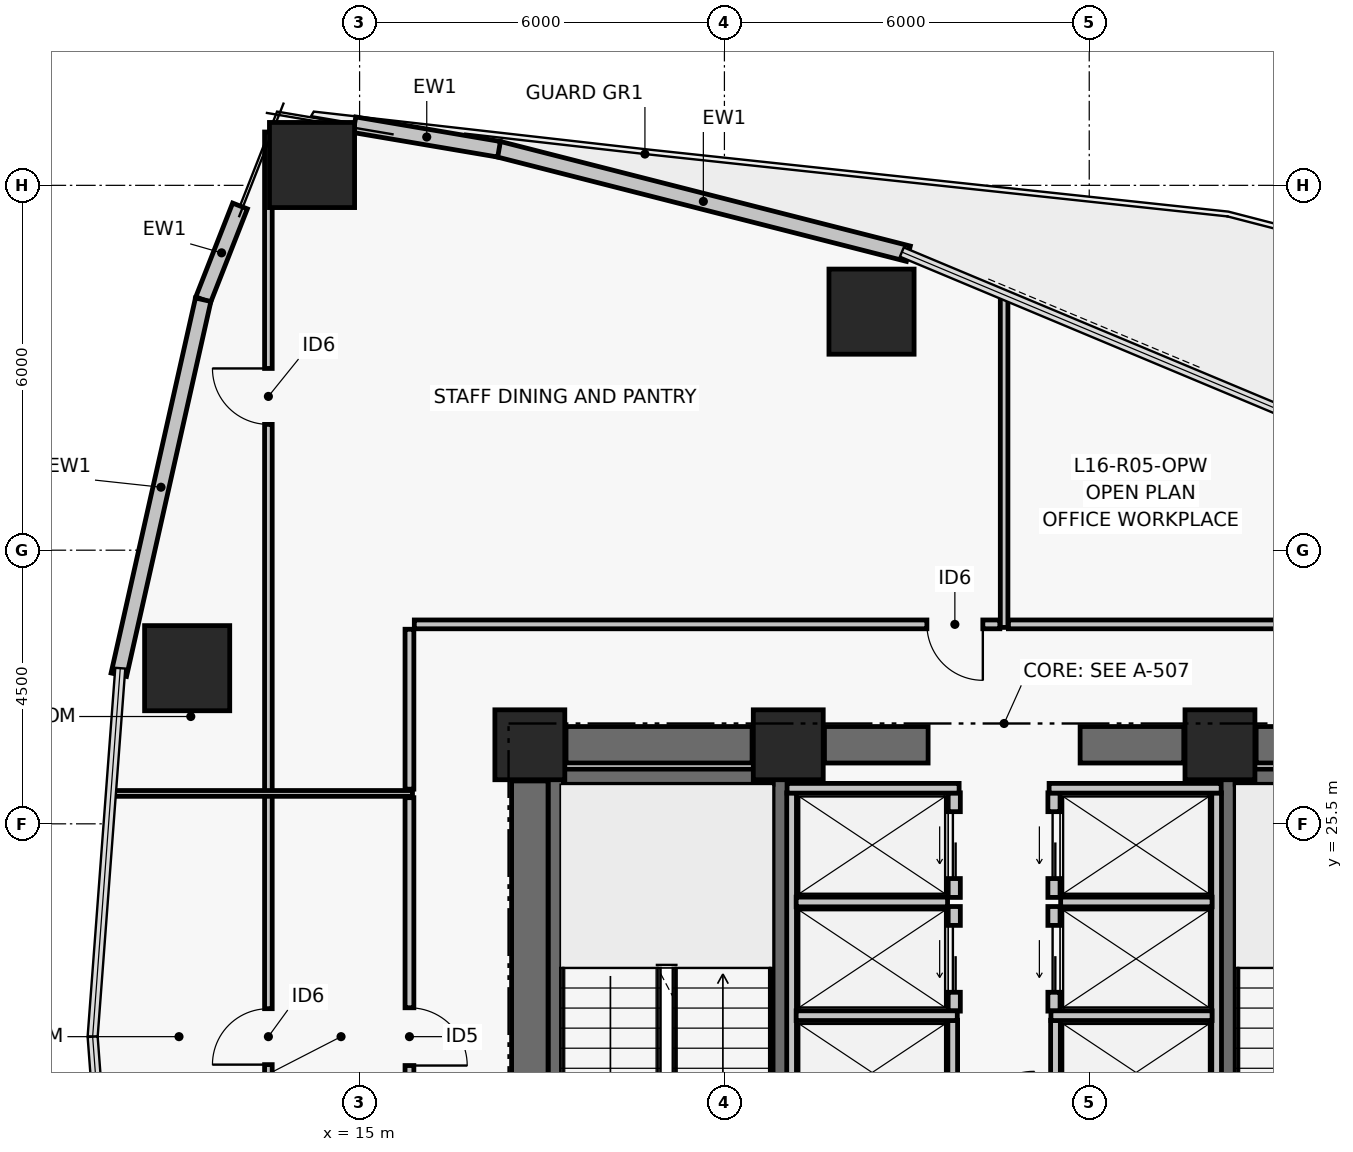
"""IFC4 building model, lengths in metres.
Left out: names, types, materials, properties, quantities, classifications, styles, units other than length and angle.
Written with IfcOpenShell. Run it as: python <this file> out.ifc"""

import sys

from ifc_helpers import new_model, si_unit, direction, frame, frame_2d, origin, origin_2d, place, context, subcontext, project, spatial, rectangle, hollow_rectangle, extrude, element, fill, save


model = new_model("IFC4")
c1 = context("Model", 3, precision=1e-05, world=origin(), true_north=direction((0.0, 1.0)))
c2 = subcontext(c1, "Body", "Model", "MODEL_VIEW")
j1 = project(units=[si_unit("LENGTHUNIT", "METRE"), si_unit("PLANEANGLEUNIT", "RADIAN")], contexts=[c1])
p1 = place(None, origin())
s1 = spatial("IfcSite", under=j1, at=p1, CompositionType="ELEMENT")
p2 = place(p1, origin())
s2 = spatial("IfcBuilding", under=s1, at=p2, CompositionType="ELEMENT")
p3 = place(p2, frame((0.0, 0.0, 68.52)))
s3 = spatial("IfcBuildingStorey", under=s2, at=p3, CompositionType="ELEMENT", Elevation=68.52)
for number, where, z_axis, x_axis in (
    (1, (17.8, 26.8, 0.0), (0.0, 0.0, 1.0), (1.0, 0.0, 0.0)),
    (2, (22.05, 26.8, 0.0), (0.0, 0.0, 1.0), (1.0, 0.0, 0.0)),
    (3, (29.15, 26.8, 0.0), (0.0, 0.0, 1.0), (1.0, 0.0, 0.0)),
):
    element("IfcColumn", number, at=place(p3, frame(where, z_axis=z_axis, x_axis=x_axis)), inside=s3, PredefinedType="COLUMN", context=c2, shape_type="SweptSolid", body=[
        extrude(rectangle(XDim=1.15, YDim=1.15, at=origin_2d()), origin(), (0.0, 0.0, 1.0), 3.72),
    ])
p4 = place(p3, frame((18.395, 26.8, 0.0), z_axis=(0.0, 0.0, 1.0), x_axis=(1.0, 0.0, 0.0)))
e4 = element("IfcWall", 4, at=p4, inside=s3, PredefinedType="SHEAR", context=c2, shape_type="SweptSolid", body=[
    extrude(rectangle(XDim=3.06, YDim=0.6, at=frame_2d((1.53, 0.0))), origin(), (0.0, 0.0, 1.0), 3.47),
])
p5 = place(p3, frame((22.645, 26.8, 0.0), z_axis=(0.0, 0.0, 1.0), x_axis=(1.0, 0.0, 0.0)))
e5 = element("IfcWall", 5, at=p5, inside=s3, PredefinedType="SHEAR", context=c2, shape_type="SweptSolid", body=[
    extrude(rectangle(XDim=1.705, YDim=0.6, at=frame_2d((0.853, 0.0))), origin(), (0.0, 0.0, 1.0), 3.47),
])
p6 = place(p3, frame((26.85, 26.8, 0.0), z_axis=(0.0, 0.0, 1.0), x_axis=(1.0, 0.0, 0.0)))
e6 = element("IfcWall", 6, at=p6, inside=s3, PredefinedType="SHEAR", context=c2, shape_type="SweptSolid", body=[
    extrude(rectangle(XDim=1.705, YDim=0.6, at=frame_2d((0.853, 0.0))), origin(), (0.0, 0.0, 1.0), 3.47),
])
p7 = place(p3, frame((29.745, 26.8, 0.0), z_axis=(0.0, 0.0, 1.0), x_axis=(1.0, 0.0, 0.0)))
e7 = element("IfcWall", 7, at=p7, inside=s3, PredefinedType="SHEAR", context=c2, shape_type="SweptSolid", body=[
    extrude(rectangle(XDim=3.06, YDim=0.6, at=frame_2d((1.53, 0.0))), origin(), (0.0, 0.0, 1.0), 3.47),
])
p8 = place(p3, frame((17.8, 17.795, 0.0), z_axis=(0.0, 0.0, 1.0), x_axis=(0.0, 1.0, 0.0)))
e8 = element("IfcWall", 8, at=p8, inside=s3, PredefinedType="SHEAR", context=c2, shape_type="SweptSolid", body=[
    extrude(rectangle(XDim=8.41, YDim=0.6, at=frame_2d((4.205, 0.0))), origin(), (0.0, 0.0, 1.0), 3.47),
])
p9 = place(p3, frame((18.229, 17.6, 0.0), z_axis=(0.0, 0.0, 1.0), x_axis=(0.0, 1.0, 0.0)))
e9 = element("IfcWall", 9, at=p9, inside=s3, PredefinedType="SHEAR", context=c2, shape_type="SweptSolid", body=[
    extrude(rectangle(XDim=8.8, YDim=0.25, at=frame_2d((4.4, 0.0))), origin(), (0.0, 0.0, 1.0), 3.47),
])
p10 = place(p3, frame((21.925, 17.6, 0.0), z_axis=(0.0, 0.0, 1.0), x_axis=(0.0, 1.0, 0.0)))
e10 = element("IfcWall", 10, at=p10, inside=s3, PredefinedType="SHEAR", context=c2, shape_type="SweptSolid", body=[
    extrude(rectangle(XDim=8.8, YDim=0.25, at=frame_2d((4.4, 0.0))), origin(), (0.0, 0.0, 1.0), 3.47),
])
p11 = place(p10, frame((0.35, 0.0, 0.0)))
e11 = element("IfcOpeningElement", 11, at=p11, cuts=e10, PredefinedType="OPENING", context=c2, shape_type="SweptSolid", body=[
    extrude(rectangle(XDim=1.05, YDim=2.08, at=frame_2d((0.525, 1.04))), frame((0.0, 0.135, 0.0), z_axis=(0.0, -1.0, 0.0), x_axis=(1.0, 0.0, 0.0)), (0.0, 0.0, 1.0), 0.27),
])
p12 = place(p3, frame((18.354, 26.275, 0.0), z_axis=(0.0, 0.0, 1.0), x_axis=(1.0, 0.0, 0.0)))
e12 = element("IfcWall", 12, at=p12, inside=s3, PredefinedType="SHEAR", context=c2, shape_type="SweptSolid", body=[
    extrude(rectangle(XDim=3.446, YDim=0.25, at=frame_2d((1.723, 0.0))), origin(), (0.0, 0.0, 1.0), 3.47),
])
p13 = place(p3, frame((29.275, 17.6, 0.0), z_axis=(0.0, 0.0, 1.0), x_axis=(0.0, 1.0, 0.0)))
e13 = element("IfcWall", 13, at=p13, inside=s3, PredefinedType="SHEAR", context=c2, shape_type="SweptSolid", body=[
    extrude(rectangle(XDim=8.8, YDim=0.25, at=frame_2d((4.4, 0.0))), origin(), (0.0, 0.0, 1.0), 3.47),
])
p14 = place(p13, frame((0.35, 0.0, 0.0)))
e14 = element("IfcOpeningElement", 14, at=p14, cuts=e13, PredefinedType="OPENING", context=c2, shape_type="SweptSolid", body=[
    extrude(rectangle(XDim=1.05, YDim=2.08, at=frame_2d((0.525, 1.04))), frame((0.0, 0.135, 0.0), z_axis=(0.0, -1.0, 0.0), x_axis=(1.0, 0.0, 0.0)), (0.0, 0.0, 1.0), 0.27),
])
p15 = place(p3, frame((29.4, 26.275, 0.0), z_axis=(0.0, 0.0, 1.0), x_axis=(1.0, 0.0, 0.0)))
e15 = element("IfcWall", 15, at=p15, inside=s3, PredefinedType="SHEAR", context=c2, shape_type="SweptSolid", body=[
    extrude(rectangle(XDim=3.446, YDim=0.25, at=frame_2d((1.723, 0.0))), origin(), (0.0, 0.0, 1.0), 3.47),
])
for number, where, z_axis, x_axis in (
    (16, (23.419, 33.923, 0.0), (0.0, 0.0, 1.0), (1.0, 0.0, 0.0)),
    (17, (14.218, 36.334, 0.0), (0.0, 0.0, 1.0), (1.0, 0.0, 0.0)),
    (18, (12.164, 28.06, 0.0), (0.0, 0.0, 1.0), (1.0, 0.0, 0.0)),
):
    element("IfcColumn", number, at=place(p3, frame(where, z_axis=z_axis, x_axis=x_axis)), inside=s3, PredefinedType="COLUMN", context=c2, shape_type="SweptSolid", body=[
        extrude(hollow_rectangle(XDim=1.4, YDim=1.4, WallThickness=0.055, at=origin_2d()), origin(), (0.0, 0.0, 1.0), 3.72),
    ])
p16 = place(p3, frame((17.282, 36.596, 0.0), z_axis=(0.0, 0.0, 1.0), x_axis=(0.968977974408, -0.247147092057, 0.0)))
e19 = element("IfcWall", 19, at=p16, inside=s3, PredefinedType="PARTITIONING", context=c2, shape_type="SweptSolid", body=[
    extrude(rectangle(XDim=6.959, YDim=0.26, at=frame_2d((3.479, 0.0))), origin(), (0.0, 0.0, 1.0), 3.47),
])
p17 = place(p3, frame((14.915, 36.997, 0.0), z_axis=(0.0, 0.0, 1.0), x_axis=(0.985905469923, -0.167303330437, 0.0)))
e20 = element("IfcWall", 20, at=p17, inside=s3, PredefinedType="PARTITIONING", context=c2, shape_type="SweptSolid", body=[
    extrude(rectangle(XDim=2.412, YDim=0.26, at=frame_2d((1.206, 0.0))), origin(), (0.0, 0.0, 1.0), 3.47),
])
p18 = place(p3, frame((12.427, 34.119, 0.0), z_axis=(0.0, 0.0, 1.0), x_axis=(0.365666052462, 0.930746119023, 0.0)))
e21 = element("IfcWall", 21, at=p18, inside=s3, PredefinedType="PARTITIONING", context=c2, shape_type="SweptSolid", body=[
    extrude(rectangle(XDim=1.656, YDim=0.26, at=frame_2d((0.828, 0.0))), origin(), (0.0, 0.0, 1.0), 3.47),
])
p19 = place(p3, frame((11.04, 27.952, 0.0), z_axis=(0.0, 0.0, 1.0), x_axis=(0.219502085231, 0.975612030768, 0.0)))
e22 = element("IfcWall", 22, at=p19, inside=s3, PredefinedType="PARTITIONING", context=c2, shape_type="SweptSolid", body=[
    extrude(rectangle(XDim=6.321, YDim=0.26, at=frame_2d((3.16, 0.0))), origin(), (0.0, 0.0, 1.0), 3.47),
])
p20 = place(p3, frame((24.78, 22.42, 0.0), z_axis=(0.0, 0.0, 1.0), x_axis=(0.0, 1.0, 0.0)))
e23 = element("IfcWall", 23, at=p20, inside=s3, PredefinedType="PARTITIONING", context=c2, shape_type="SweptSolid", body=[
    extrude(rectangle(XDim=1.72, YDim=0.2, at=frame_2d((0.86, 0.0))), origin(), (0.0, 0.0, 1.0), 3.47),
])
p21 = place(p20, frame((0.31, 0.0, 0.0)))
e24 = element("IfcOpeningElement", 24, at=p21, cuts=e23, PredefinedType="OPENING", context=c2, shape_type="SweptSolid", body=[
    extrude(rectangle(XDim=1.1, YDim=2.08, at=frame_2d((0.55, 1.04))), frame((0.0, 0.11, 0.0), z_axis=(0.0, -1.0, 0.0), x_axis=(1.0, 0.0, 0.0)), (0.0, 0.0, 1.0), 0.22),
])
p22 = place(p3, frame((24.78, 24.29, 0.0), z_axis=(0.0, 0.0, 1.0), x_axis=(0.0, 1.0, 0.0)))
e25 = element("IfcWall", 25, at=p22, inside=s3, PredefinedType="PARTITIONING", context=c2, shape_type="SweptSolid", body=[
    extrude(rectangle(XDim=1.72, YDim=0.2, at=frame_2d((0.86, 0.0))), origin(), (0.0, 0.0, 1.0), 3.47),
])
p23 = place(p22, frame((0.31, 0.0, 0.0)))
e26 = element("IfcOpeningElement", 26, at=p23, cuts=e25, PredefinedType="OPENING", context=c2, shape_type="SweptSolid", body=[
    extrude(rectangle(XDim=1.1, YDim=2.08, at=frame_2d((0.55, 1.04))), frame((0.0, 0.11, 0.0), z_axis=(0.0, -1.0, 0.0), x_axis=(1.0, 0.0, 0.0)), (0.0, 0.0, 1.0), 0.22),
])
p24 = place(p3, frame((26.42, 22.42, 0.0), z_axis=(0.0, 0.0, 1.0), x_axis=(0.0, 1.0, 0.0)))
e27 = element("IfcWall", 27, at=p24, inside=s3, PredefinedType="PARTITIONING", context=c2, shape_type="SweptSolid", body=[
    extrude(rectangle(XDim=1.72, YDim=0.2, at=frame_2d((0.86, 0.0))), origin(), (0.0, 0.0, 1.0), 3.47),
])
p25 = place(p24, frame((0.31, 0.0, 0.0)))
e28 = element("IfcOpeningElement", 28, at=p25, cuts=e27, PredefinedType="OPENING", context=c2, shape_type="SweptSolid", body=[
    extrude(rectangle(XDim=1.1, YDim=2.08, at=frame_2d((0.55, 1.04))), frame((0.0, 0.11, 0.0), z_axis=(0.0, -1.0, 0.0), x_axis=(1.0, 0.0, 0.0)), (0.0, 0.0, 1.0), 0.22),
])
p26 = place(p3, frame((26.42, 24.29, 0.0), z_axis=(0.0, 0.0, 1.0), x_axis=(0.0, 1.0, 0.0)))
e29 = element("IfcWall", 29, at=p26, inside=s3, PredefinedType="PARTITIONING", context=c2, shape_type="SweptSolid", body=[
    extrude(rectangle(XDim=1.72, YDim=0.2, at=frame_2d((0.86, 0.0))), origin(), (0.0, 0.0, 1.0), 3.47),
])
p27 = place(p26, frame((0.31, 0.0, 0.0)))
e30 = element("IfcOpeningElement", 30, at=p27, cuts=e29, PredefinedType="OPENING", context=c2, shape_type="SweptSolid", body=[
    extrude(rectangle(XDim=1.1, YDim=2.08, at=frame_2d((0.55, 1.04))), frame((0.0, 0.11, 0.0), z_axis=(0.0, -1.0, 0.0), x_axis=(1.0, 0.0, 0.0)), (0.0, 0.0, 1.0), 0.22),
])
p28 = place(p3, frame((22.105, 20.56, 0.0), z_axis=(0.0, 0.0, 1.0), x_axis=(0.0, 1.0, 0.0)))
e31 = element("IfcWall", 31, at=p28, inside=s3, PredefinedType="PARTITIONING", context=c2, shape_type="SweptSolid", body=[
    extrude(rectangle(XDim=5.45, YDim=0.16, at=frame_2d((2.725, 0.0))), origin(), (0.0, 0.0, 1.0), 3.47),
])
p29 = place(p3, frame((24.755, 20.56, 0.0), z_axis=(0.0, 0.0, 1.0), x_axis=(0.0, 1.0, 0.0)))
e32 = element("IfcWall", 32, at=p29, inside=s3, PredefinedType="PARTITIONING", context=c2, shape_type="SweptSolid", body=[
    extrude(rectangle(XDim=1.71, YDim=0.16, at=frame_2d((0.855, 0.0))), origin(), (0.0, 0.0, 1.0), 3.47),
])
p30 = place(p3, frame((22.18, 22.345, 0.0), z_axis=(0.0, 0.0, 1.0), x_axis=(1.0, 0.0, 0.0)))
e33 = element("IfcWall", 33, at=p30, inside=s3, PredefinedType="PARTITIONING", context=c2, shape_type="SweptSolid", body=[
    extrude(rectangle(XDim=2.65, YDim=0.16, at=frame_2d((1.325, 0.0))), origin(), (0.0, 0.0, 1.0), 3.47),
])
p31 = place(p3, frame((22.18, 24.215, 0.0), z_axis=(0.0, 0.0, 1.0), x_axis=(1.0, 0.0, 0.0)))
e34 = element("IfcWall", 34, at=p31, inside=s3, PredefinedType="PARTITIONING", context=c2, shape_type="SweptSolid", body=[
    extrude(rectangle(XDim=2.49, YDim=0.16, at=frame_2d((1.245, 0.0))), origin(), (0.0, 0.0, 1.0), 3.47),
])
p32 = place(p3, frame((22.03, 26.085, 0.0), z_axis=(0.0, 0.0, 1.0), x_axis=(1.0, 0.0, 0.0)))
e35 = element("IfcWall", 35, at=p32, inside=s3, PredefinedType="PARTITIONING", context=c2, shape_type="SweptSolid", body=[
    extrude(rectangle(XDim=2.83, YDim=0.16, at=frame_2d((1.415, 0.0))), origin(), (0.0, 0.0, 1.0), 3.47),
])
p33 = place(p3, frame((29.095, 20.56, 0.0), z_axis=(0.0, 0.0, 1.0), x_axis=(0.0, 1.0, 0.0)))
e36 = element("IfcWall", 36, at=p33, inside=s3, PredefinedType="PARTITIONING", context=c2, shape_type="SweptSolid", body=[
    extrude(rectangle(XDim=5.45, YDim=0.16, at=frame_2d((2.725, 0.0))), origin(), (0.0, 0.0, 1.0), 3.47),
])
p34 = place(p3, frame((26.445, 20.56, 0.0), z_axis=(0.0, 0.0, 1.0), x_axis=(0.0, 1.0, 0.0)))
e37 = element("IfcWall", 37, at=p34, inside=s3, PredefinedType="PARTITIONING", context=c2, shape_type="SweptSolid", body=[
    extrude(rectangle(XDim=1.71, YDim=0.16, at=frame_2d((0.855, 0.0))), origin(), (0.0, 0.0, 1.0), 3.47),
])
p35 = place(p3, frame((26.37, 22.345, 0.0), z_axis=(0.0, 0.0, 1.0), x_axis=(1.0, 0.0, 0.0)))
e38 = element("IfcWall", 38, at=p35, inside=s3, PredefinedType="PARTITIONING", context=c2, shape_type="SweptSolid", body=[
    extrude(rectangle(XDim=2.65, YDim=0.16, at=frame_2d((1.325, 0.0))), origin(), (0.0, 0.0, 1.0), 3.47),
])
p36 = place(p3, frame((26.53, 24.215, 0.0), z_axis=(0.0, 0.0, 1.0), x_axis=(1.0, 0.0, 0.0)))
e39 = element("IfcWall", 39, at=p36, inside=s3, PredefinedType="PARTITIONING", context=c2, shape_type="SweptSolid", body=[
    extrude(rectangle(XDim=2.49, YDim=0.16, at=frame_2d((1.245, 0.0))), origin(), (0.0, 0.0, 1.0), 3.47),
])
p37 = place(p3, frame((26.34, 26.085, 0.0), z_axis=(0.0, 0.0, 1.0), x_axis=(1.0, 0.0, 0.0)))
e40 = element("IfcWall", 40, at=p37, inside=s3, PredefinedType="PARTITIONING", context=c2, shape_type="SweptSolid", body=[
    extrude(rectangle(XDim=2.83, YDim=0.16, at=frame_2d((1.415, 0.0))), origin(), (0.0, 0.0, 1.0), 3.47),
])
p38 = place(p3, frame((32.297, 28.78, 0.0), z_axis=(0.0, 0.0, 1.0), x_axis=(-1.0, 0.0, 0.0)))
e41 = element("IfcWall", 41, at=p38, inside=s3, PredefinedType="PARTITIONING", context=c2, shape_type="SweptSolid", body=[
    extrude(rectangle(XDim=6.627, YDim=0.145, at=frame_2d((3.314, 0.0))), origin(), (0.0, 0.0, 1.0), 3.47),
])
p39 = place(p3, frame((25.53, 28.78, 0.0), z_axis=(0.0, 0.0, 1.0), x_axis=(-1.0, 0.0, 0.0)))
e42 = element("IfcWall", 42, at=p39, inside=s3, PredefinedType="PARTITIONING", context=c2, shape_type="SweptSolid", body=[
    extrude(rectangle(XDim=9.63, YDim=0.145, at=frame_2d((4.815, 0.0))), origin(), (0.0, 0.0, 1.0), 2.2),
])
p40 = place(p39, frame((0.28, 0.0, 0.0)))
e43 = element("IfcOpeningElement", 43, at=p40, cuts=e42, PredefinedType="OPENING", context=c2, shape_type="SweptSolid", body=[
    extrude(rectangle(XDim=0.92, YDim=2.05, at=frame_2d((0.46, 1.025))), frame((0.0, 0.083, 0.0), z_axis=(0.0, -1.0, 0.0), x_axis=(1.0, 0.0, 0.0)), (0.0, 0.0, 1.0), 0.165),
])
p41 = place(p3, frame((15.82, 28.7, 0.0), z_axis=(0.0, 0.0, 1.0), x_axis=(0.0, -1.0, 0.0)))
e44 = element("IfcWall", 44, at=p41, inside=s3, PredefinedType="PARTITIONING", context=c2, shape_type="SweptSolid", body=[
    extrude(rectangle(XDim=2.63, YDim=0.145, at=frame_2d((1.315, 0.0))), origin(), (0.0, 0.0, 1.0), 2.2),
])
p42 = place(p3, frame((15.82, 25.93, 0.0), z_axis=(0.0, 0.0, 1.0), x_axis=(0.0, -1.0, 0.0)))
e45 = element("IfcWall", 45, at=p42, inside=s3, PredefinedType="PARTITIONING", context=c2, shape_type="SweptSolid", body=[
    extrude(rectangle(XDim=7.86, YDim=0.145, at=frame_2d((3.93, 0.0))), origin(), (0.0, 0.0, 1.0), 3.47),
])
p43 = place(p42, frame((3.455, 0.0, 0.0)))
e46 = element("IfcOpeningElement", 46, at=p43, cuts=e45, PredefinedType="OPENING", context=c2, shape_type="SweptSolid", body=[
    extrude(rectangle(XDim=0.95, YDim=2.06, at=frame_2d((0.475, 1.03))), frame((0.0, 0.083, 0.0), z_axis=(0.0, -1.0, 0.0), x_axis=(1.0, 0.0, 0.0)), (0.0, 0.0, 1.0), 0.165),
])
p44 = place(p3, frame((13.5, 7.123, 0.0), z_axis=(0.0, 0.0, 1.0), x_axis=(0.0, 1.0, 0.0)))
e47 = element("IfcWall", 47, at=p44, inside=s3, PredefinedType="PARTITIONING", context=c2, shape_type="SweptSolid", body=[
    extrude(rectangle(XDim=29.754, YDim=0.125, at=frame_2d((14.877, 0.0))), origin(), (0.0, 0.0, 1.0), 2.2),
])
p45 = place(p44, frame((3.888, 0.0, 0.0)))
e48 = element("IfcOpeningElement", 48, at=p45, cuts=e47, PredefinedType="OPENING", context=c2, shape_type="SweptSolid", body=[
    extrude(rectangle(XDim=0.92, YDim=2.05, at=frame_2d((0.46, 1.025))), frame((0.0, 0.073, 0.0), z_axis=(0.0, -1.0, 0.0), x_axis=(1.0, 0.0, 0.0)), (0.0, 0.0, 1.0), 0.145),
])
p46 = place(p44, frame((24.946, 0.0, 0.0)))
e49 = element("IfcOpeningElement", 49, at=p46, cuts=e47, PredefinedType="OPENING", context=c2, shape_type="SweptSolid", body=[
    extrude(rectangle(XDim=0.92, YDim=2.05, at=frame_2d((0.46, 1.025))), frame((0.0, 0.073, 0.0), z_axis=(0.0, -1.0, 0.0), x_axis=(1.0, 0.0, 0.0)), (0.0, 0.0, 1.0), 0.145),
])
p47 = place(p44, frame((14.417, 0.0, 0.0)))
e50 = element("IfcOpeningElement", 50, at=p47, cuts=e47, PredefinedType="OPENING", context=c2, shape_type="SweptSolid", body=[
    extrude(rectangle(XDim=0.92, YDim=2.05, at=frame_2d((0.46, 1.025))), frame((0.0, 0.073, 0.0), z_axis=(0.0, -1.0, 0.0), x_axis=(1.0, 0.0, 0.0)), (0.0, 0.0, 1.0), 0.145),
])
p48 = place(p3, frame((25.6, 28.73, 0.0), z_axis=(0.0, 0.0, 1.0), x_axis=(0.0, 1.0, 0.0)))
e51 = element("IfcWall", 51, at=p48, inside=s3, PredefinedType="PARTITIONING", context=c2, shape_type="SweptSolid", body=[
    extrude(rectangle(XDim=5.48, YDim=0.125, at=frame_2d((2.74, 0.0))), origin(), (0.0, 0.0, 1.0), 2.85),
])
p49 = place(p3, frame((10.9, 26.0, 0.0), z_axis=(0.0, 0.0, 1.0), x_axis=(1.0, 0.0, 0.0)))
e52 = element("IfcWall", 52, at=p49, inside=s3, PredefinedType="PARTITIONING", context=c2, shape_type="SweptSolid", body=[
    extrude(rectangle(XDim=4.97, YDim=0.095, at=frame_2d((2.485, 0.0))), origin(), (0.0, 0.0, 1.0), 2.85),
])
p50 = place(p21, origin())
e53 = element("IfcDoor", 53, at=p50, inside=s3, OperationType="DOUBLE_DOOR_SLIDING", PredefinedType="DOOR", context=c2, shape_type="SweptSolid", body=[
    extrude(rectangle(XDim=1.1, YDim=2.08, at=frame_2d((0.55, 1.04))), frame((0.0, 0.025, 0.0), z_axis=(0.0, -1.0, 0.0), x_axis=(1.0, 0.0, 0.0)), (0.0, 0.0, 1.0), 0.05),
])
fill(e24, e53)
p51 = place(p23, origin())
e54 = element("IfcDoor", 54, at=p51, inside=s3, OperationType="DOUBLE_DOOR_SLIDING", PredefinedType="DOOR", context=c2, shape_type="SweptSolid", body=[
    extrude(rectangle(XDim=1.1, YDim=2.08, at=frame_2d((0.55, 1.04))), frame((0.0, 0.025, 0.0), z_axis=(0.0, -1.0, 0.0), x_axis=(1.0, 0.0, 0.0)), (0.0, 0.0, 1.0), 0.05),
])
fill(e26, e54)
p52 = place(p25, origin())
e55 = element("IfcDoor", 55, at=p52, inside=s3, OperationType="DOUBLE_DOOR_SLIDING", PredefinedType="DOOR", context=c2, shape_type="SweptSolid", body=[
    extrude(rectangle(XDim=1.1, YDim=2.08, at=frame_2d((0.55, 1.04))), frame((0.0, 0.025, 0.0), z_axis=(0.0, -1.0, 0.0), x_axis=(1.0, 0.0, 0.0)), (0.0, 0.0, 1.0), 0.05),
])
fill(e28, e55)
p53 = place(p27, origin())
e56 = element("IfcDoor", 56, at=p53, inside=s3, OperationType="DOUBLE_DOOR_SLIDING", PredefinedType="DOOR", context=c2, shape_type="SweptSolid", body=[
    extrude(rectangle(XDim=1.1, YDim=2.08, at=frame_2d((0.55, 1.04))), frame((0.0, 0.025, 0.0), z_axis=(0.0, -1.0, 0.0), x_axis=(1.0, 0.0, 0.0)), (0.0, 0.0, 1.0), 0.05),
])
fill(e30, e56)
p54 = place(p40, origin())
e57 = element("IfcDoor", 57, at=p54, inside=s3, OperationType="SINGLE_SWING_LEFT", PredefinedType="DOOR", context=c2, shape_type="SweptSolid", body=[
    extrude(rectangle(XDim=0.92, YDim=2.05, at=frame_2d((0.46, 1.025))), frame((0.0, 0.025, 0.0), z_axis=(0.0, -1.0, 0.0), x_axis=(1.0, 0.0, 0.0)), (0.0, 0.0, 1.0), 0.05),
])
fill(e43, e57)
p55 = place(p43, origin())
e58 = element("IfcDoor", 58, at=p55, inside=s3, OperationType="SINGLE_SWING_RIGHT", PredefinedType="DOOR", context=c2, shape_type="SweptSolid", body=[
    extrude(rectangle(XDim=0.95, YDim=2.06, at=frame_2d((0.475, 1.03))), frame((0.0, 0.025, 0.0), z_axis=(0.0, -1.0, 0.0), x_axis=(1.0, 0.0, 0.0)), (0.0, 0.0, 1.0), 0.05),
])
fill(e46, e58)
p56 = place(p46, origin())
e59 = element("IfcDoor", 59, at=p56, inside=s3, OperationType="SINGLE_SWING_RIGHT", PredefinedType="DOOR", context=c2, shape_type="SweptSolid", body=[
    extrude(rectangle(XDim=0.92, YDim=2.05, at=frame_2d((0.46, 1.025))), frame((0.0, 0.025, 0.0), z_axis=(0.0, -1.0, 0.0), x_axis=(1.0, 0.0, 0.0)), (0.0, 0.0, 1.0), 0.05),
])
fill(e49, e59)
p57 = place(p47, origin())
e60 = element("IfcDoor", 60, at=p57, inside=s3, OperationType="SINGLE_SWING_LEFT", PredefinedType="DOOR", context=c2, shape_type="SweptSolid", body=[
    extrude(rectangle(XDim=0.92, YDim=2.05, at=frame_2d((0.46, 1.025))), frame((0.0, 0.025, 0.0), z_axis=(0.0, -1.0, 0.0), x_axis=(1.0, 0.0, 0.0)), (0.0, 0.0, 1.0), 0.05),
])
fill(e50, e60)
save(model, sys.argv[1])
